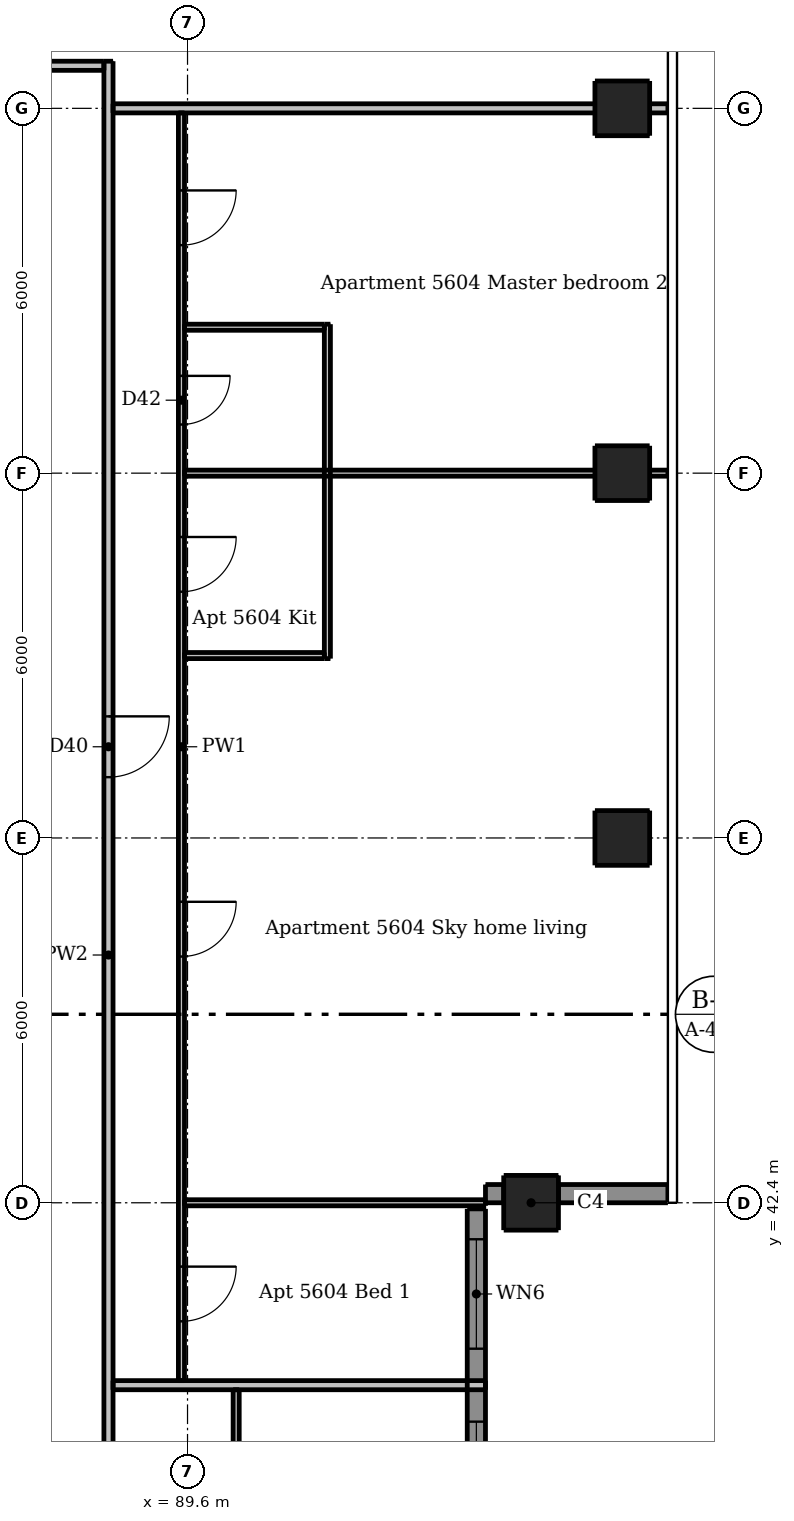
"""IFC4 building model, lengths in metres.
Left out: names, types, materials, properties, quantities, classifications, styles, units other than length and angle.
Written with IfcOpenShell. Run it as: python <this file> out.ifc"""

import sys

from ifc_helpers import new_model, si_unit, direction, frame, frame_2d, origin, origin_2d, place, context, subcontext, project, spatial, rectangle, extrude, element, fill, save


model = new_model("IFC4")
c1 = context("Model", 3, precision=1e-05, world=origin(), true_north=direction((0.0, 1.0)))
c2 = subcontext(c1, "Body", "Model", "MODEL_VIEW")
j1 = project(units=[si_unit("LENGTHUNIT", "METRE"), si_unit("PLANEANGLEUNIT", "RADIAN")], contexts=[c1])
p1 = place(None, origin())
s1 = spatial("IfcSite", under=j1, at=p1, CompositionType="ELEMENT")
p2 = place(p1, origin())
s2 = spatial("IfcBuilding", under=s1, at=p2, CompositionType="ELEMENT")
p3 = place(p2, frame((0.0, 0.0, 210.1)))
s3 = spatial("IfcBuildingStorey", under=s2, at=p3, CompositionType="ELEMENT", Elevation=210.1)
for number, where, z_axis, x_axis in (
    (1, (95.25, 42.4, 0.0), (0.0, 0.0, 1.0), (1.0, 0.0, 0.0)),
    (2, (96.75, 48.4, 0.0), (0.0, 0.0, 1.0), (1.0, 0.0, 0.0)),
    (3, (96.75, 54.4, 0.0), (0.0, 0.0, 1.0), (1.0, 0.0, 0.0)),
    (4, (96.75, 60.4, 0.0), (0.0, 0.0, 1.0), (1.0, 0.0, 0.0)),
):
    element("IfcColumn", number, at=place(p3, frame(where, z_axis=z_axis, x_axis=x_axis)), inside=s3, PredefinedType="COLUMN", context=c2, shape_type="SweptSolid", body=[
        extrude(rectangle(XDim=0.9, YDim=0.9, at=origin_2d()), origin(), (0.0, 0.0, 1.0), 3.05),
    ])
p4 = place(p3, frame((94.5, 42.55, 0.0), z_axis=(0.0, 0.0, 1.0), x_axis=(1.0, 0.0, 0.0)))
e5 = element("IfcWall", 5, at=p4, inside=s3, PredefinedType="SOLIDWALL", context=c2, shape_type="SweptSolid", body=[
    extrude(rectangle(XDim=0.3, YDim=0.3, at=frame_2d((0.15, 0.0))), origin(), (0.0, 0.0, 1.0), 3.05),
])
p5 = place(p3, frame((95.7, 42.55, 0.0), z_axis=(0.0, 0.0, 1.0), x_axis=(1.0, 0.0, 0.0)))
e6 = element("IfcWall", 6, at=p5, inside=s3, PredefinedType="SOLIDWALL", context=c2, shape_type="SweptSolid", body=[
    extrude(rectangle(XDim=1.8, YDim=0.3, at=frame_2d((0.9, 0.0))), origin(), (0.0, 0.0, 1.0), 3.05),
])
p6 = place(p3, frame((94.35, 36.4, 0.0), z_axis=(0.0, 0.0, 1.0), x_axis=(0.0, 1.0, 0.0)))
e7 = element("IfcWall", 7, at=p6, inside=s3, PredefinedType="SOLIDWALL", context=c2, shape_type="SweptSolid", body=[
    extrude(rectangle(XDim=5.9, YDim=0.3, at=frame_2d((2.95, 0.0))), origin(), (0.0, 0.0, 1.0), 3.05),
])
p7 = place(p6, frame((0.6, 0.0, 0.15)))
e8 = element("IfcOpeningElement", 8, at=p7, cuts=e7, PredefinedType="OPENING", context=c2, shape_type="SweptSolid", body=[
    extrude(rectangle(XDim=1.8, YDim=2.1, at=frame_2d((0.9, 1.05))), frame((0.0, 0.16, 0.0), z_axis=(0.0, -1.0, 0.0), x_axis=(1.0, 0.0, 0.0)), (0.0, 0.0, 1.0), 0.32),
])
p8 = place(p6, frame((3.6, 0.0, 0.15)))
e9 = element("IfcOpeningElement", 9, at=p8, cuts=e7, PredefinedType="OPENING", context=c2, shape_type="SweptSolid", body=[
    extrude(rectangle(XDim=1.8, YDim=2.1, at=frame_2d((0.9, 1.05))), frame((0.0, 0.16, 0.0), z_axis=(0.0, -1.0, 0.0), x_axis=(1.0, 0.0, 0.0)), (0.0, 0.0, 1.0), 0.32),
])
p9 = place(p3, frame((89.5, 60.325, 0.0), z_axis=(0.0, 0.0, 1.0), x_axis=(0.0, -1.0, 0.0)))
e10 = element("IfcWall", 10, at=p9, inside=s3, PredefinedType="PARTITIONING", context=c2, shape_type="SweptSolid", body=[
    extrude(rectangle(XDim=20.85, YDim=0.1, at=frame_2d((10.425, 0.0))), origin(), (0.0, 0.0, 1.0), 2.51),
])
p10 = place(p9, frame((12.975, 0.0, 0.0)))
e11 = element("IfcOpeningElement", 11, at=p10, cuts=e10, PredefinedType="OPENING", context=c2, shape_type="SweptSolid", body=[
    extrude(rectangle(XDim=0.9, YDim=2.1, at=frame_2d((0.45, 1.05))), frame((0.0, 0.06, 0.0), z_axis=(0.0, -1.0, 0.0), x_axis=(1.0, 0.0, 0.0)), (0.0, 0.0, 1.0), 0.12),
])
p11 = place(p9, frame((6.975, 0.0, 0.0)))
e12 = element("IfcOpeningElement", 12, at=p11, cuts=e10, PredefinedType="OPENING", context=c2, shape_type="SweptSolid", body=[
    extrude(rectangle(XDim=0.9, YDim=2.1, at=frame_2d((0.45, 1.05))), frame((0.0, 0.06, 0.0), z_axis=(0.0, -1.0, 0.0), x_axis=(1.0, 0.0, 0.0)), (0.0, 0.0, 1.0), 0.12),
])
p12 = place(p9, frame((18.975, 0.0, 0.0)))
e13 = element("IfcOpeningElement", 13, at=p12, cuts=e10, PredefinedType="OPENING", context=c2, shape_type="SweptSolid", body=[
    extrude(rectangle(XDim=0.9, YDim=2.1, at=frame_2d((0.45, 1.05))), frame((0.0, 0.06, 0.0), z_axis=(0.0, -1.0, 0.0), x_axis=(1.0, 0.0, 0.0)), (0.0, 0.0, 1.0), 0.12),
])
p13 = place(p9, frame((1.275, 0.0, 0.0)))
e14 = element("IfcOpeningElement", 14, at=p13, cuts=e10, PredefinedType="OPENING", context=c2, shape_type="SweptSolid", body=[
    extrude(rectangle(XDim=0.9, YDim=2.1, at=frame_2d((0.45, 1.05))), frame((0.0, 0.06, 0.0), z_axis=(0.0, -1.0, 0.0), x_axis=(1.0, 0.0, 0.0)), (0.0, 0.0, 1.0), 0.12),
])
p14 = place(p9, frame((4.325, 0.0, 0.0)))
e15 = element("IfcOpeningElement", 15, at=p14, cuts=e10, PredefinedType="OPENING", context=c2, shape_type="SweptSolid", body=[
    extrude(rectangle(XDim=0.8, YDim=2.1, at=frame_2d((0.4, 1.05))), frame((0.0, 0.06, 0.0), z_axis=(0.0, -1.0, 0.0), x_axis=(1.0, 0.0, 0.0)), (0.0, 0.0, 1.0), 0.12),
])
p15 = place(p3, frame((90.4, 33.45, 0.0), z_axis=(0.0, 0.0, 1.0), x_axis=(0.0, 1.0, 0.0)))
e16 = element("IfcWall", 16, at=p15, inside=s3, PredefinedType="PARTITIONING", context=c2, shape_type="SweptSolid", body=[
    extrude(rectangle(XDim=5.875, YDim=0.1, at=frame_2d((2.938, 0.0))), origin(), (0.0, 0.0, 1.0), 3.05),
])
p16 = place(p15, frame((3.75, 0.0, 0.0)))
e17 = element("IfcOpeningElement", 17, at=p16, cuts=e16, PredefinedType="OPENING", context=c2, shape_type="SweptSolid", body=[
    extrude(rectangle(XDim=0.8, YDim=2.1, at=frame_2d((0.4, 1.05))), frame((0.0, 0.06, 0.0), z_axis=(0.0, -1.0, 0.0), x_axis=(1.0, 0.0, 0.0)), (0.0, 0.0, 1.0), 0.12),
])
p17 = place(p3, frame((91.9, 51.35, 0.0), z_axis=(0.0, 0.0, 1.0), x_axis=(0.0, 1.0, 0.0)))
e18 = element("IfcWall", 18, at=p17, inside=s3, PredefinedType="PARTITIONING", context=c2, shape_type="SweptSolid", body=[
    extrude(rectangle(XDim=5.5, YDim=0.1, at=frame_2d((2.75, 0.0))), origin(), (0.0, 0.0, 1.0), 3.05),
])
p18 = place(p3, frame((89.55, 56.8, 0.0), z_axis=(0.0, 0.0, 1.0), x_axis=(1.0, 0.0, 0.0)))
e19 = element("IfcWall", 19, at=p18, inside=s3, PredefinedType="PARTITIONING", context=c2, shape_type="SweptSolid", body=[
    extrude(rectangle(XDim=2.3, YDim=0.1, at=frame_2d((1.15, 0.0))), origin(), (0.0, 0.0, 1.0), 3.05),
])
p19 = place(p3, frame((89.55, 54.4, 0.0), z_axis=(0.0, 0.0, 1.0), x_axis=(1.0, 0.0, 0.0)))
e20 = element("IfcWall", 20, at=p19, inside=s3, PredefinedType="PARTITIONING", context=c2, shape_type="SweptSolid", body=[
    extrude(rectangle(XDim=7.95, YDim=0.1, at=frame_2d((3.975, 0.0))), origin(), (0.0, 0.0, 1.0), 2.516),
])
p20 = place(p3, frame((89.55, 51.4, 0.0), z_axis=(0.0, 0.0, 1.0), x_axis=(1.0, 0.0, 0.0)))
e21 = element("IfcWall", 21, at=p20, inside=s3, PredefinedType="PARTITIONING", context=c2, shape_type="SweptSolid", body=[
    extrude(rectangle(XDim=2.3, YDim=0.1, at=frame_2d((1.15, 0.0))), origin(), (0.0, 0.0, 1.0), 3.05),
])
p21 = place(p3, frame((89.55, 42.4, 0.0), z_axis=(0.0, 0.0, 1.0), x_axis=(1.0, 0.0, 0.0)))
e22 = element("IfcWall", 22, at=p21, inside=s3, PredefinedType="PARTITIONING", context=c2, shape_type="SweptSolid", body=[
    extrude(rectangle(XDim=4.95, YDim=0.1, at=frame_2d((2.475, 0.0))), origin(), (0.0, 0.0, 1.0), 2.59),
])
p22 = place(p3, frame((88.3, 61.175, 0.0), z_axis=(0.0, 0.0, 1.0), x_axis=(0.0, -1.0, 0.0)))
e23 = element("IfcWall", 23, at=p22, inside=s3, PredefinedType="PARTITIONING", context=c2, shape_type="SweptSolid", body=[
    extrude(rectangle(XDim=29.4, YDim=0.15, at=frame_2d((14.7, 0.0))), origin(), (0.0, 0.0, 1.0), 3.05),
])
p23 = place(p22, frame((28.125, 0.0, 0.0)))
e24 = element("IfcOpeningElement", 24, at=p23, cuts=e23, PredefinedType="OPENING", context=c2, shape_type="SweptSolid", body=[
    extrude(rectangle(XDim=1.0, YDim=2.1, at=frame_2d((0.5, 1.05))), frame((0.0, 0.085, 0.0), z_axis=(0.0, -1.0, 0.0), x_axis=(1.0, 0.0, 0.0)), (0.0, 0.0, 1.0), 0.17),
])
p24 = place(p22, frame((10.775, 0.0, 0.0)))
e25 = element("IfcOpeningElement", 25, at=p24, cuts=e23, PredefinedType="OPENING", context=c2, shape_type="SweptSolid", body=[
    extrude(rectangle(XDim=1.0, YDim=2.1, at=frame_2d((0.5, 1.05))), frame((0.0, 0.085, 0.0), z_axis=(0.0, -1.0, 0.0), x_axis=(1.0, 0.0, 0.0)), (0.0, 0.0, 1.0), 0.17),
])
p25 = place(p3, frame((58.975, 61.1, 0.0), z_axis=(0.0, 0.0, 1.0), x_axis=(1.0, 0.0, 0.0)))
e26 = element("IfcWall", 26, at=p25, inside=s3, PredefinedType="PARTITIONING", context=c2, shape_type="SweptSolid", body=[
    extrude(rectangle(XDim=29.25, YDim=0.15, at=frame_2d((14.625, 0.0))), origin(), (0.0, 0.0, 1.0), 3.05),
])
p26 = place(p25, frame((9.125, 0.0, 0.0)))
e27 = element("IfcOpeningElement", 27, at=p26, cuts=e26, PredefinedType="OPENING", context=c2, shape_type="SweptSolid", body=[
    extrude(rectangle(XDim=1.0, YDim=2.1, at=frame_2d((0.5, 1.05))), frame((0.0, 0.085, 0.0), z_axis=(0.0, -1.0, 0.0), x_axis=(1.0, 0.0, 0.0)), (0.0, 0.0, 1.0), 0.17),
])
p27 = place(p25, frame((26.475, 0.0, 0.0)))
e28 = element("IfcOpeningElement", 28, at=p27, cuts=e26, PredefinedType="OPENING", context=c2, shape_type="SweptSolid", body=[
    extrude(rectangle(XDim=1.0, YDim=2.1, at=frame_2d((0.5, 1.05))), frame((0.0, 0.085, 0.0), z_axis=(0.0, -1.0, 0.0), x_axis=(1.0, 0.0, 0.0)), (0.0, 0.0, 1.0), 0.17),
])
p28 = place(p3, frame((88.375, 60.4, 0.0), z_axis=(0.0, 0.0, 1.0), x_axis=(1.0, 0.0, 0.0)))
e29 = element("IfcWall", 29, at=p28, inside=s3, PredefinedType="PARTITIONING", context=c2, shape_type="SweptSolid", body=[
    extrude(rectangle(XDim=9.125, YDim=0.15, at=frame_2d((4.562, 0.0))), origin(), (0.0, 0.0, 1.0), 2.59),
])
p29 = place(p3, frame((88.375, 39.4, 0.0), z_axis=(0.0, 0.0, 1.0), x_axis=(1.0, 0.0, 0.0)))
e30 = element("IfcWall", 30, at=p29, inside=s3, PredefinedType="PARTITIONING", context=c2, shape_type="SweptSolid", body=[
    extrude(rectangle(XDim=6.125, YDim=0.15, at=frame_2d((3.062, 0.0))), origin(), (0.0, 0.0, 1.0), 3.05),
])
p30 = place(p7, origin())
e31 = element("IfcWindow", 31, at=p30, inside=s3, PartitioningType="DOUBLE_PANEL_VERTICAL", PredefinedType="WINDOW", context=c2, shape_type="SweptSolid", body=[
    extrude(rectangle(XDim=1.8, YDim=2.1, at=frame_2d((0.9, 1.05))), frame((0.0, 0.03, 0.0), z_axis=(0.0, -1.0, 0.0), x_axis=(1.0, 0.0, 0.0)), (0.0, 0.0, 1.0), 0.06),
])
fill(e8, e31)
p31 = place(p8, origin())
e32 = element("IfcWindow", 32, at=p31, inside=s3, PartitioningType="DOUBLE_PANEL_VERTICAL", PredefinedType="WINDOW", context=c2, shape_type="SweptSolid", body=[
    extrude(rectangle(XDim=1.8, YDim=2.1, at=frame_2d((0.9, 1.05))), frame((0.0, 0.03, 0.0), z_axis=(0.0, -1.0, 0.0), x_axis=(1.0, 0.0, 0.0)), (0.0, 0.0, 1.0), 0.06),
])
fill(e9, e32)
p32 = place(p24, origin())
e33 = element("IfcDoor", 33, at=p32, inside=s3, OperationType="SINGLE_SWING_LEFT", PredefinedType="DOOR", context=c2, shape_type="SweptSolid", body=[
    extrude(rectangle(XDim=1.0, YDim=2.1, at=frame_2d((0.5, 1.05))), frame((0.0, 0.025, 0.0), z_axis=(0.0, -1.0, 0.0), x_axis=(1.0, 0.0, 0.0)), (0.0, 0.0, 1.0), 0.05),
])
fill(e25, e33)
p33 = place(p10, origin())
e34 = element("IfcDoor", 34, at=p33, inside=s3, OperationType="SINGLE_SWING_LEFT", PredefinedType="DOOR", context=c2, shape_type="SweptSolid", body=[
    extrude(rectangle(XDim=0.9, YDim=2.1, at=frame_2d((0.45, 1.05))), frame((0.0, 0.025, 0.0), z_axis=(0.0, -1.0, 0.0), x_axis=(1.0, 0.0, 0.0)), (0.0, 0.0, 1.0), 0.05),
])
fill(e11, e34)
p34 = place(p11, origin())
e35 = element("IfcDoor", 35, at=p34, inside=s3, OperationType="SINGLE_SWING_LEFT", PredefinedType="DOOR", context=c2, shape_type="SweptSolid", body=[
    extrude(rectangle(XDim=0.9, YDim=2.1, at=frame_2d((0.45, 1.05))), frame((0.0, 0.025, 0.0), z_axis=(0.0, -1.0, 0.0), x_axis=(1.0, 0.0, 0.0)), (0.0, 0.0, 1.0), 0.05),
])
fill(e12, e35)
p35 = place(p12, origin())
e36 = element("IfcDoor", 36, at=p35, inside=s3, OperationType="SINGLE_SWING_LEFT", PredefinedType="DOOR", context=c2, shape_type="SweptSolid", body=[
    extrude(rectangle(XDim=0.9, YDim=2.1, at=frame_2d((0.45, 1.05))), frame((0.0, 0.025, 0.0), z_axis=(0.0, -1.0, 0.0), x_axis=(1.0, 0.0, 0.0)), (0.0, 0.0, 1.0), 0.05),
])
fill(e13, e36)
p36 = place(p13, origin())
e37 = element("IfcDoor", 37, at=p36, inside=s3, OperationType="SINGLE_SWING_LEFT", PredefinedType="DOOR", context=c2, shape_type="SweptSolid", body=[
    extrude(rectangle(XDim=0.9, YDim=2.1, at=frame_2d((0.45, 1.05))), frame((0.0, 0.025, 0.0), z_axis=(0.0, -1.0, 0.0), x_axis=(1.0, 0.0, 0.0)), (0.0, 0.0, 1.0), 0.05),
])
fill(e14, e37)
p37 = place(p14, origin())
e38 = element("IfcDoor", 38, at=p37, inside=s3, OperationType="SINGLE_SWING_LEFT", PredefinedType="DOOR", context=c2, shape_type="SweptSolid", body=[
    extrude(rectangle(XDim=0.8, YDim=2.1, at=frame_2d((0.4, 1.05))), frame((0.0, 0.025, 0.0), z_axis=(0.0, -1.0, 0.0), x_axis=(1.0, 0.0, 0.0)), (0.0, 0.0, 1.0), 0.05),
])
fill(e15, e38)
save(model, sys.argv[1])
